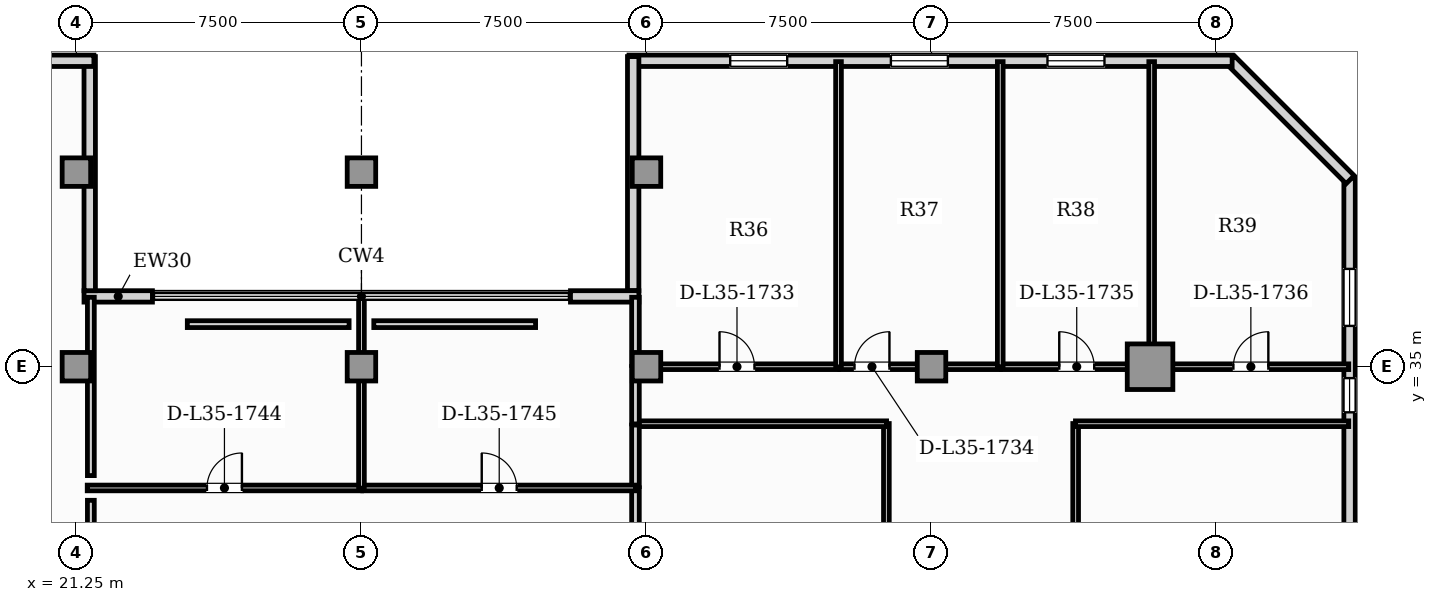
"""IFC4 building model, lengths in metres.
Left out: names, types, materials, properties, quantities, classifications, styles, units other than length and angle.
Written with IfcOpenShell. Run it as: python <this file> out.ifc"""

import sys

from ifc_helpers import new_model, si_unit, direction, frame, frame_2d, origin, origin_2d, place, context, subcontext, project, spatial, rectangle, hollow_rectangle, extrude, element, fill, save


model = new_model("IFC4")
c1 = context("Model", 3, precision=1e-05, world=origin(), true_north=direction((0.0, 1.0)))
c2 = subcontext(c1, "Body", "Model", "MODEL_VIEW")
j1 = project(units=[si_unit("LENGTHUNIT", "METRE"), si_unit("PLANEANGLEUNIT", "RADIAN")], contexts=[c1])
p1 = place(None, origin())
s1 = spatial("IfcSite", under=j1, at=p1, CompositionType="ELEMENT")
p2 = place(p1, origin())
s2 = spatial("IfcBuilding", under=s1, at=p2, CompositionType="ELEMENT")
p3 = place(p2, frame((0.0, 0.0, 145.2)))
s3 = spatial("IfcBuildingStorey", under=s2, at=p3, CompositionType="ELEMENT", Elevation=145.2)
p4 = place(p3, frame((49.5, 35.0, 0.0), z_axis=(0.0, 0.0, 1.0), x_axis=(1.0, 0.0, 0.0)))
e1 = element("IfcColumn", 1, at=p4, inside=s3, PredefinedType="USERDEFINED", context=c2, shape_type="SweptSolid", body=[
    extrude(hollow_rectangle(XDim=1.2, YDim=1.2, WallThickness=0.07, at=origin_2d()), origin(), (0.0, 0.0, 1.0), 3.85),
])
for number, where, z_axis, x_axis in (
    (2, (21.25, 40.12, 0.0), (0.0, 0.0, 1.0), (1.0, 0.0, 0.0)),
    (3, (28.75, 40.12, 0.0), (0.0, 0.0, 1.0), (1.0, 0.0, 0.0)),
    (4, (36.25, 40.12, 0.0), (0.0, 0.0, 1.0), (1.0, 0.0, 0.0)),
    (5, (21.25, 35.0, 0.0), (0.0, 0.0, 1.0), (1.0, 0.0, 0.0)),
    (6, (28.75, 35.0, 0.0), (0.0, 0.0, 1.0), (1.0, 0.0, 0.0)),
    (7, (36.25, 35.0, 0.0), (0.0, 0.0, 1.0), (1.0, 0.0, 0.0)),
    (8, (43.75, 35.0, 0.0), (0.0, 0.0, 1.0), (1.0, 0.0, 0.0)),
):
    element("IfcColumn", number, at=place(p3, frame(where, z_axis=z_axis, x_axis=x_axis)), inside=s3, PredefinedType="COLUMN", context=c2, shape_type="SweptSolid", body=[
        extrude(rectangle(XDim=0.75, YDim=0.75, at=origin_2d()), origin(), (0.0, 0.0, 1.0), 3.85),
    ])
p5 = place(p3, frame((54.75, 3.24, 0.0), z_axis=(0.0, 0.0, 1.0), x_axis=(0.0, 1.0, 0.0)))
e9 = element("IfcWall", 9, at=p5, inside=s3, PredefinedType="SOLIDWALL", context=c2, shape_type="SweptSolid", body=[
    extrude(rectangle(XDim=36.72, YDim=0.3, at=frame_2d((18.36, 0.0))), origin(), (0.0, 0.0, 1.0), 3.63),
])
p6 = place(p5, frame((30.56, 0.0, 0.95)))
e10 = element("IfcOpeningElement", 10, at=p6, cuts=e9, PredefinedType="OPENING", context=c2, shape_type="SweptSolid", body=[
    extrude(rectangle(XDim=0.9, YDim=1.5, at=frame_2d((0.45, 0.75))), frame((0.0, 0.16, 0.0), z_axis=(0.0, -1.0, 0.0), x_axis=(1.0, 0.0, 0.0)), (0.0, 0.0, 1.0), 0.32),
])
p7 = place(p5, frame((10.995, 0.0, 0.95)))
e11 = element("IfcOpeningElement", 11, at=p7, cuts=e9, PredefinedType="OPENING", context=c2, shape_type="SweptSolid", body=[
    extrude(rectangle(XDim=0.9, YDim=1.5, at=frame_2d((0.45, 0.75))), frame((0.0, 0.16, 0.0), z_axis=(0.0, -1.0, 0.0), x_axis=(1.0, 0.0, 0.0)), (0.0, 0.0, 1.0), 0.32),
])
p8 = place(p5, frame((13.568, 0.0, 0.9)))
e12 = element("IfcOpeningElement", 12, at=p8, cuts=e9, PredefinedType="OPENING", context=c2, shape_type="SweptSolid", body=[
    extrude(rectangle(XDim=1.5, YDim=1.95, at=frame_2d((0.75, 0.975))), frame((0.0, 0.16, 0.0), z_axis=(0.0, -1.0, 0.0), x_axis=(1.0, 0.0, 0.0)), (0.0, 0.0, 1.0), 0.32),
])
p9 = place(p5, frame((18.404, 0.0, 0.9)))
e13 = element("IfcOpeningElement", 13, at=p9, cuts=e9, PredefinedType="OPENING", context=c2, shape_type="SweptSolid", body=[
    extrude(rectangle(XDim=1.5, YDim=1.95, at=frame_2d((0.75, 0.975))), frame((0.0, 0.16, 0.0), z_axis=(0.0, -1.0, 0.0), x_axis=(1.0, 0.0, 0.0)), (0.0, 0.0, 1.0), 0.32),
])
p10 = place(p5, frame((25.396, 0.0, 0.9)))
e14 = element("IfcOpeningElement", 14, at=p10, cuts=e9, PredefinedType="OPENING", context=c2, shape_type="SweptSolid", body=[
    extrude(rectangle(XDim=1.5, YDim=1.95, at=frame_2d((0.75, 0.975))), frame((0.0, 0.16, 0.0), z_axis=(0.0, -1.0, 0.0), x_axis=(1.0, 0.0, 0.0)), (0.0, 0.0, 1.0), 0.32),
])
p11 = place(p5, frame((32.834, 0.0, 0.9)))
e15 = element("IfcOpeningElement", 15, at=p11, cuts=e9, PredefinedType="OPENING", context=c2, shape_type="SweptSolid", body=[
    extrude(rectangle(XDim=1.5, YDim=1.95, at=frame_2d((0.75, 0.975))), frame((0.0, 0.16, 0.0), z_axis=(0.0, -1.0, 0.0), x_axis=(1.0, 0.0, 0.0)), (0.0, 0.0, 1.0), 0.32),
])
p12 = place(p3, frame((54.766, 39.922, 0.0), z_axis=(0.0, 0.0, 1.0), x_axis=(-0.707079321262, 0.707134240044, 0.0)))
e16 = element("IfcWall", 16, at=p12, inside=s3, PredefinedType="SOLIDWALL", context=c2, shape_type="SweptSolid", body=[
    extrude(rectangle(XDim=4.446, YDim=0.3, at=frame_2d((2.223, 0.0))), origin(), (0.0, 0.0, 1.0), 3.63),
])
p13 = place(p3, frame((51.66, 43.05, 0.0), z_axis=(0.0, 0.0, 1.0), x_axis=(-1.0, 0.0, 0.0)))
e17 = element("IfcWall", 17, at=p13, inside=s3, PredefinedType="SOLIDWALL", context=c2, shape_type="SweptSolid", body=[
    extrude(rectangle(XDim=15.87, YDim=0.3, at=frame_2d((7.935, 0.0))), origin(), (0.0, 0.0, 1.0), 3.63),
])
p14 = place(p13, frame((11.708, 0.0, 0.9)))
e18 = element("IfcOpeningElement", 18, at=p14, cuts=e17, PredefinedType="OPENING", context=c2, shape_type="SweptSolid", body=[
    extrude(rectangle(XDim=1.5, YDim=1.95, at=frame_2d((0.75, 0.975))), frame((0.0, 0.16, 0.0), z_axis=(0.0, -1.0, 0.0), x_axis=(1.0, 0.0, 0.0)), (0.0, 0.0, 1.0), 0.32),
])
p15 = place(p13, frame((7.479, 0.0, 0.9)))
e19 = element("IfcOpeningElement", 19, at=p15, cuts=e17, PredefinedType="OPENING", context=c2, shape_type="SweptSolid", body=[
    extrude(rectangle(XDim=1.5, YDim=1.95, at=frame_2d((0.75, 0.975))), frame((0.0, 0.16, 0.0), z_axis=(0.0, -1.0, 0.0), x_axis=(1.0, 0.0, 0.0)), (0.0, 0.0, 1.0), 0.32),
])
p16 = place(p13, frame((3.359, 0.0, 0.9)))
e20 = element("IfcOpeningElement", 20, at=p16, cuts=e17, PredefinedType="OPENING", context=c2, shape_type="SweptSolid", body=[
    extrude(rectangle(XDim=1.5, YDim=1.95, at=frame_2d((0.75, 0.975))), frame((0.0, 0.16, 0.0), z_axis=(0.0, -1.0, 0.0), x_axis=(1.0, 0.0, 0.0)), (0.0, 0.0, 1.0), 0.32),
])
p17 = place(p3, frame((35.9, 43.16, 0.0), z_axis=(0.0, 0.0, 1.0), x_axis=(0.0, -1.0, 0.0)))
e21 = element("IfcWall", 21, at=p17, inside=s3, PredefinedType="SOLIDWALL", context=c2, shape_type="SweptSolid", body=[
    extrude(rectangle(XDim=6.16, YDim=0.3, at=frame_2d((3.08, 0.0))), origin(), (0.0, 0.0, 1.0), 3.63),
])
for number, where, z_axis, x_axis in (
    (22, (21.45, 36.85, 0.0), (0.0, 0.0, 1.0), (1.0, 0.0, 0.0)),
    (23, (34.25, 36.85, 0.0), (0.0, 0.0, 1.0), (1.0, 0.0, 0.0)),
):
    element("IfcWall", number, at=place(p3, frame(where, z_axis=z_axis, x_axis=x_axis)), inside=s3, PredefinedType="SOLIDWALL", context=c2, shape_type="SweptSolid", body=[
        extrude(rectangle(XDim=1.8, YDim=0.3, at=frame_2d((0.9, 0.0))), origin(), (0.0, 0.0, 1.0), 3.63),
    ])
p18 = place(p3, frame((21.6, 37.0, 0.0), z_axis=(0.0, 0.0, 1.0), x_axis=(0.0, 1.0, 0.0)))
e24 = element("IfcWall", 24, at=p18, inside=s3, PredefinedType="SOLIDWALL", context=c2, shape_type="SweptSolid", body=[
    extrude(rectangle(XDim=6.16, YDim=0.3, at=frame_2d((3.08, 0.0))), origin(), (0.0, 0.0, 1.0), 3.63),
])
p19 = place(p3, frame((21.71, 43.05, 0.0), z_axis=(0.0, 0.0, 1.0), x_axis=(-1.0, 0.0, 0.0)))
e25 = element("IfcWall", 25, at=p19, inside=s3, PredefinedType="SOLIDWALL", context=c2, shape_type="SweptSolid", body=[
    extrude(rectangle(XDim=15.87, YDim=0.3, at=frame_2d((7.935, 0.0))), origin(), (0.0, 0.0, 1.0), 3.63),
])
p20 = place(p19, frame((14.19, 0.0, 0.95)))
e26 = element("IfcOpeningElement", 26, at=p20, cuts=e25, PredefinedType="OPENING", context=c2, shape_type="SweptSolid", body=[
    extrude(rectangle(XDim=0.9, YDim=1.5, at=frame_2d((0.45, 0.75))), frame((0.0, 0.16, 0.0), z_axis=(0.0, -1.0, 0.0), x_axis=(1.0, 0.0, 0.0)), (0.0, 0.0, 1.0), 0.32),
])
p21 = place(p19, frame((11.055, 0.0, 0.9)))
e27 = element("IfcOpeningElement", 27, at=p21, cuts=e25, PredefinedType="OPENING", context=c2, shape_type="SweptSolid", body=[
    extrude(rectangle(XDim=1.5, YDim=1.95, at=frame_2d((0.75, 0.975))), frame((0.0, 0.16, 0.0), z_axis=(0.0, -1.0, 0.0), x_axis=(1.0, 0.0, 0.0)), (0.0, 0.0, 1.0), 0.32),
])
p22 = place(p19, frame((7.479, 0.0, 0.9)))
e28 = element("IfcOpeningElement", 28, at=p22, cuts=e25, PredefinedType="OPENING", context=c2, shape_type="SweptSolid", body=[
    extrude(rectangle(XDim=1.5, YDim=1.95, at=frame_2d((0.75, 0.975))), frame((0.0, 0.16, 0.0), z_axis=(0.0, -1.0, 0.0), x_axis=(1.0, 0.0, 0.0)), (0.0, 0.0, 1.0), 0.32),
])
p23 = place(p3, frame((42.562, 24.479, 0.0), z_axis=(0.0, 0.0, 1.0), x_axis=(0.0, 1.0, 0.0)))
e29 = element("IfcWall", 29, at=p23, inside=s3, PredefinedType="PARTITIONING", context=c2, shape_type="SweptSolid", body=[
    extrude(rectangle(XDim=9.026, YDim=0.15, at=frame_2d((4.513, 0.0))), origin(), (0.0, 0.0, 1.0), 3.63),
])
p24 = place(p23, frame((5.407, 0.0, 0.0)))
e30 = element("IfcOpeningElement", 30, at=p24, cuts=e29, PredefinedType="OPENING", context=c2, shape_type="SweptSolid", body=[
    extrude(rectangle(XDim=0.92, YDim=2.1, at=frame_2d((0.46, 1.05))), frame((0.0, 0.085, 0.0), z_axis=(0.0, -1.0, 0.0), x_axis=(1.0, 0.0, 0.0)), (0.0, 0.0, 1.0), 0.17),
])
p25 = place(p3, frame((35.955, 33.5, 0.0), z_axis=(0.0, 0.0, 1.0), x_axis=(1.0, 0.0, 0.0)))
e31 = element("IfcWall", 31, at=p25, inside=s3, PredefinedType="PARTITIONING", context=c2, shape_type="SweptSolid", body=[
    extrude(rectangle(XDim=6.612, YDim=0.15, at=frame_2d((3.306, 0.0))), origin(), (0.0, 0.0, 1.0), 3.63),
])
p26 = place(p3, frame((47.542, 25.307, 0.0), z_axis=(0.0, 0.0, 1.0), x_axis=(0.0, 1.0, 0.0)))
e32 = element("IfcWall", 32, at=p26, inside=s3, PredefinedType="PARTITIONING", context=c2, shape_type="SweptSolid", body=[
    extrude(rectangle(XDim=8.198, YDim=0.15, at=frame_2d((4.099, 0.0))), origin(), (0.0, 0.0, 1.0), 3.177),
])
p27 = place(p26, frame((3.639, 0.0, 0.0)))
e33 = element("IfcOpeningElement", 33, at=p27, cuts=e32, PredefinedType="OPENING", context=c2, shape_type="SweptSolid", body=[
    extrude(rectangle(XDim=0.92, YDim=2.1, at=frame_2d((0.46, 1.05))), frame((0.0, 0.085, 0.0), z_axis=(0.0, -1.0, 0.0), x_axis=(1.0, 0.0, 0.0)), (0.0, 0.0, 1.0), 0.17),
])
p28 = place(p3, frame((47.537, 33.5, 0.0), z_axis=(0.0, 0.0, 1.0), x_axis=(1.0, 0.0, 0.0)))
e34 = element("IfcWall", 34, at=p28, inside=s3, PredefinedType="PARTITIONING", context=c2, shape_type="SweptSolid", body=[
    extrude(rectangle(XDim=7.19, YDim=0.15, at=frame_2d((3.595, 0.0))), origin(), (0.0, 0.0, 1.0), 3.63),
])
p29 = place(p3, frame((35.955, 35.0, 0.0), z_axis=(0.0, 0.0, 1.0), x_axis=(1.0, 0.0, 0.0)))
e35 = element("IfcWall", 35, at=p29, inside=s3, PredefinedType="PARTITIONING", context=c2, shape_type="SweptSolid", body=[
    extrude(rectangle(XDim=5.353, YDim=0.15, at=frame_2d((2.676, 0.0))), origin(), (0.0, 0.0, 1.0), 3.013),
])
p30 = place(p29, frame((2.216, 0.0, 0.0)))
e36 = element("IfcOpeningElement", 36, at=p30, cuts=e35, PredefinedType="OPENING", context=c2, shape_type="SweptSolid", body=[
    extrude(rectangle(XDim=0.92, YDim=2.1, at=frame_2d((0.46, 1.05))), frame((0.0, 0.085, 0.0), z_axis=(0.0, -1.0, 0.0), x_axis=(1.0, 0.0, 0.0)), (0.0, 0.0, 1.0), 0.17),
])
p31 = place(p3, frame((41.338, 35.0, 0.0), z_axis=(0.0, 0.0, 1.0), x_axis=(1.0, 0.0, 0.0)))
e37 = element("IfcWall", 37, at=p31, inside=s3, PredefinedType="PARTITIONING", context=c2, shape_type="SweptSolid", body=[
    extrude(rectangle(XDim=4.226, YDim=0.15, at=frame_2d((2.113, 0.0))), origin(), (0.0, 0.0, 1.0), 3.013),
])
p32 = place(p31, frame((0.385, 0.0, 0.0)))
e38 = element("IfcOpeningElement", 38, at=p32, cuts=e37, PredefinedType="OPENING", context=c2, shape_type="SweptSolid", body=[
    extrude(rectangle(XDim=0.92, YDim=2.1, at=frame_2d((0.46, 1.05))), frame((0.0, 0.085, 0.0), z_axis=(0.0, -1.0, 0.0), x_axis=(1.0, 0.0, 0.0)), (0.0, 0.0, 1.0), 0.17),
])
p33 = place(p3, frame((45.594, 35.0, 0.0), z_axis=(0.0, 0.0, 1.0), x_axis=(1.0, 0.0, 0.0)))
e39 = element("IfcWall", 39, at=p33, inside=s3, PredefinedType="PARTITIONING", context=c2, shape_type="SweptSolid", body=[
    extrude(rectangle(XDim=3.954, YDim=0.15, at=frame_2d((1.977, 0.0))), origin(), (0.0, 0.0, 1.0), 3.013),
])
p34 = place(p33, frame((1.517, 0.0, 0.0)))
e40 = element("IfcOpeningElement", 40, at=p34, cuts=e39, PredefinedType="OPENING", context=c2, shape_type="SweptSolid", body=[
    extrude(rectangle(XDim=0.92, YDim=2.1, at=frame_2d((0.46, 1.05))), frame((0.0, 0.085, 0.0), z_axis=(0.0, -1.0, 0.0), x_axis=(1.0, 0.0, 0.0)), (0.0, 0.0, 1.0), 0.17),
])
p35 = place(p3, frame((49.578, 35.0, 0.0), z_axis=(0.0, 0.0, 1.0), x_axis=(1.0, 0.0, 0.0)))
e41 = element("IfcWall", 41, at=p35, inside=s3, PredefinedType="PARTITIONING", context=c2, shape_type="SweptSolid", body=[
    extrude(rectangle(XDim=5.15, YDim=0.15, at=frame_2d((2.575, 0.0))), origin(), (0.0, 0.0, 1.0), 3.63),
])
p36 = place(p35, frame((2.115, 0.0, 0.0)))
e42 = element("IfcOpeningElement", 42, at=p36, cuts=e41, PredefinedType="OPENING", context=c2, shape_type="SweptSolid", body=[
    extrude(rectangle(XDim=0.92, YDim=2.1, at=frame_2d((0.46, 1.05))), frame((0.0, 0.085, 0.0), z_axis=(0.0, -1.0, 0.0), x_axis=(1.0, 0.0, 0.0)), (0.0, 0.0, 1.0), 0.17),
])
p37 = place(p3, frame((35.96, 33.495, 0.0), z_axis=(0.0, 0.0, 1.0), x_axis=(0.0, 1.0, 0.0)))
e43 = element("IfcWall", 43, at=p37, inside=s3, PredefinedType="PARTITIONING", context=c2, shape_type="SweptSolid", body=[
    extrude(rectangle(XDim=1.51, YDim=0.2, at=frame_2d((0.755, 0.0))), origin(), (0.0, 0.0, 1.0), 3.63),
])
p38 = place(p3, frame((35.96, 30.305, 0.0), z_axis=(0.0, 0.0, 1.0), x_axis=(0.0, 1.0, 0.0)))
e44 = element("IfcWall", 44, at=p38, inside=s3, PredefinedType="PARTITIONING", context=c2, shape_type="SweptSolid", body=[
    extrude(rectangle(XDim=1.51, YDim=0.2, at=frame_2d((0.755, 0.0))), origin(), (0.0, 0.0, 1.0), 3.63),
])
p39 = place(p3, frame((35.96, 31.845, 0.0), z_axis=(0.0, 0.0, 1.0), x_axis=(0.0, 1.0, 0.0)))
e45 = element("IfcWall", 45, at=p39, inside=s3, PredefinedType="PARTITIONING", context=c2, shape_type="SweptSolid", body=[
    extrude(rectangle(XDim=1.62, YDim=0.2, at=frame_2d((0.81, 0.0))), origin(), (0.0, 0.0, 1.0), 3.63),
])
p40 = place(p3, frame((41.303, 34.995, 0.0), z_axis=(0.0, 0.0, 1.0), x_axis=(0.0, 1.0, 0.0)))
e46 = element("IfcWall", 46, at=p40, inside=s3, PredefinedType="PARTITIONING", context=c2, shape_type="SweptSolid", body=[
    extrude(rectangle(XDim=8.032, YDim=0.15, at=frame_2d((4.016, 0.0))), origin(), (0.0, 0.0, 1.0), 3.63),
])
p41 = place(p3, frame((35.96, 35.035, 0.0), z_axis=(0.0, 0.0, 1.0), x_axis=(0.0, 1.0, 0.0)))
e47 = element("IfcWall", 47, at=p41, inside=s3, PredefinedType="PARTITIONING", context=c2, shape_type="SweptSolid", body=[
    extrude(rectangle(XDim=1.792, YDim=0.2, at=frame_2d((0.896, 0.0))), origin(), (0.0, 0.0, 1.0), 3.63),
])
for number, where, z_axis, x_axis in (
    (48, (45.559, 34.995, 0.0), (0.0, 0.0, 1.0), (0.0, 1.0, 0.0)),
    (49, (49.542, 34.995, 0.0), (0.0, 0.0, 1.0), (0.0, 1.0, 0.0)),
):
    element("IfcWall", number, at=place(p3, frame(where, z_axis=z_axis, x_axis=x_axis)), inside=s3, PredefinedType="PARTITIONING", context=c2, shape_type="SweptSolid", body=[
        extrude(rectangle(XDim=8.032, YDim=0.15, at=frame_2d((4.016, 0.0))), origin(), (0.0, 0.0, 1.0), 3.63),
    ])
p42 = place(p3, frame((21.535, 31.81, 0.0), z_axis=(0.0, 0.0, 1.0), x_axis=(1.0, 0.0, 0.0)))
e50 = element("IfcWall", 50, at=p42, inside=s3, PredefinedType="PARTITIONING", context=c2, shape_type="SweptSolid", body=[
    extrude(rectangle(XDim=7.22, YDim=0.15, at=frame_2d((3.61, 0.0))), origin(), (0.0, 0.0, 1.0), 3.63),
])
p43 = place(p42, frame((3.15, 0.0, 0.0)))
e51 = element("IfcOpeningElement", 51, at=p43, cuts=e50, PredefinedType="OPENING", context=c2, shape_type="SweptSolid", body=[
    extrude(rectangle(XDim=0.92, YDim=2.1, at=frame_2d((0.46, 1.05))), frame((0.0, 0.085, 0.0), z_axis=(0.0, -1.0, 0.0), x_axis=(1.0, 0.0, 0.0)), (0.0, 0.0, 1.0), 0.17),
])
p44 = place(p3, frame((28.785, 31.81, 0.0), z_axis=(0.0, 0.0, 1.0), x_axis=(1.0, 0.0, 0.0)))
e52 = element("IfcWall", 52, at=p44, inside=s3, PredefinedType="PARTITIONING", context=c2, shape_type="SweptSolid", body=[
    extrude(rectangle(XDim=7.18, YDim=0.15, at=frame_2d((3.59, 0.0))), origin(), (0.0, 0.0, 1.0), 3.63),
])
p45 = place(p44, frame((3.13, 0.0, 0.0)))
e53 = element("IfcOpeningElement", 53, at=p45, cuts=e52, PredefinedType="OPENING", context=c2, shape_type="SweptSolid", body=[
    extrude(rectangle(XDim=0.92, YDim=2.1, at=frame_2d((0.46, 1.05))), frame((0.0, 0.085, 0.0), z_axis=(0.0, -1.0, 0.0), x_axis=(1.0, 0.0, 0.0)), (0.0, 0.0, 1.0), 0.17),
])
p46 = place(p3, frame((28.75, 31.805, 0.0), z_axis=(0.0, 0.0, 1.0), x_axis=(0.0, 1.0, 0.0)))
e54 = element("IfcWall", 54, at=p46, inside=s3, PredefinedType="PARTITIONING", context=c2, shape_type="SweptSolid", body=[
    extrude(rectangle(XDim=5.021, YDim=0.15, at=frame_2d((2.51, 0.0))), origin(), (0.0, 0.0, 1.0), 3.177),
])
p47 = place(p3, frame((21.63, 30.635, 0.0), z_axis=(0.0, 0.0, 1.0), x_axis=(0.0, 1.0, 0.0)))
e55 = element("IfcWall", 55, at=p47, inside=s3, PredefinedType="PARTITIONING", context=c2, shape_type="SweptSolid", body=[
    extrude(rectangle(XDim=0.85, YDim=0.18, at=frame_2d((0.425, 0.0))), origin(), (0.0, 0.0, 1.0), 3.63),
])
p48 = place(p3, frame((21.63, 32.135, 0.0), z_axis=(0.0, 0.0, 1.0), x_axis=(0.0, 1.0, 0.0)))
e56 = element("IfcWall", 56, at=p48, inside=s3, PredefinedType="PARTITIONING", context=c2, shape_type="SweptSolid", body=[
    extrude(rectangle(XDim=4.692, YDim=0.18, at=frame_2d((2.346, 0.0))), origin(), (0.0, 0.0, 1.0), 3.63),
])
for number, where, z_axis, x_axis in (
    (57, (24.168, 36.12, 0.0), (0.0, 0.0, 1.0), (1.0, 0.0, 0.0)),
    (58, (29.075, 36.12, 0.0), (0.0, 0.0, 1.0), (1.0, 0.0, 0.0)),
):
    element("IfcWall", number, at=place(p3, frame(where, z_axis=z_axis, x_axis=x_axis)), inside=s3, PredefinedType="PARTITIONING", context=c2, shape_type="SweptSolid", body=[
        extrude(rectangle(XDim=4.257, YDim=0.18, at=frame_2d((2.128, 0.0))), origin(), (0.0, 0.0, 1.0), 3.63),
    ])
p49 = place(p6, origin())
e59 = element("IfcWindow", 59, at=p49, inside=s3, PartitioningType="SINGLE_PANEL", PredefinedType="WINDOW", context=c2, shape_type="SweptSolid", body=[
    extrude(rectangle(XDim=0.9, YDim=1.5, at=frame_2d((0.45, 0.75))), frame((0.0, 0.03, 0.0), z_axis=(0.0, -1.0, 0.0), x_axis=(1.0, 0.0, 0.0)), (0.0, 0.0, 1.0), 0.06),
])
fill(e10, e59)
p50 = place(p14, origin())
e60 = element("IfcWindow", 60, at=p50, inside=s3, PartitioningType="SINGLE_PANEL", PredefinedType="WINDOW", context=c2, shape_type="SweptSolid", body=[
    extrude(rectangle(XDim=1.5, YDim=1.95, at=frame_2d((0.75, 0.975))), frame((0.0, 0.03, 0.0), z_axis=(0.0, -1.0, 0.0), x_axis=(1.0, 0.0, 0.0)), (0.0, 0.0, 1.0), 0.06),
])
fill(e18, e60)
p51 = place(p15, origin())
e61 = element("IfcWindow", 61, at=p51, inside=s3, PartitioningType="SINGLE_PANEL", PredefinedType="WINDOW", context=c2, shape_type="SweptSolid", body=[
    extrude(rectangle(XDim=1.5, YDim=1.95, at=frame_2d((0.75, 0.975))), frame((0.0, 0.03, 0.0), z_axis=(0.0, -1.0, 0.0), x_axis=(1.0, 0.0, 0.0)), (0.0, 0.0, 1.0), 0.06),
])
fill(e19, e61)
p52 = place(p16, origin())
e62 = element("IfcWindow", 62, at=p52, inside=s3, PartitioningType="SINGLE_PANEL", PredefinedType="WINDOW", context=c2, shape_type="SweptSolid", body=[
    extrude(rectangle(XDim=1.5, YDim=1.95, at=frame_2d((0.75, 0.975))), frame((0.0, 0.03, 0.0), z_axis=(0.0, -1.0, 0.0), x_axis=(1.0, 0.0, 0.0)), (0.0, 0.0, 1.0), 0.06),
])
fill(e20, e62)
p53 = place(p11, origin())
e63 = element("IfcWindow", 63, at=p53, inside=s3, PartitioningType="SINGLE_PANEL", PredefinedType="WINDOW", context=c2, shape_type="SweptSolid", body=[
    extrude(rectangle(XDim=1.5, YDim=1.95, at=frame_2d((0.75, 0.975))), frame((0.0, 0.03, 0.0), z_axis=(0.0, -1.0, 0.0), x_axis=(1.0, 0.0, 0.0)), (0.0, 0.0, 1.0), 0.06),
])
fill(e15, e63)
p54 = place(p30, origin())
e64 = element("IfcDoor", 64, at=p54, inside=s3, OperationType="SINGLE_SWING_LEFT", PredefinedType="DOOR", context=c2, shape_type="SweptSolid", body=[
    extrude(rectangle(XDim=0.92, YDim=2.1, at=frame_2d((0.46, 1.05))), frame((0.0, 0.025, 0.0), z_axis=(0.0, -1.0, 0.0), x_axis=(1.0, 0.0, 0.0)), (0.0, 0.0, 1.0), 0.05),
])
fill(e36, e64)
p55 = place(p32, origin())
e65 = element("IfcDoor", 65, at=p55, inside=s3, OperationType="SINGLE_SWING_RIGHT", PredefinedType="DOOR", context=c2, shape_type="SweptSolid", body=[
    extrude(rectangle(XDim=0.92, YDim=2.1, at=frame_2d((0.46, 1.05))), frame((0.0, 0.025, 0.0), z_axis=(0.0, -1.0, 0.0), x_axis=(1.0, 0.0, 0.0)), (0.0, 0.0, 1.0), 0.05),
])
fill(e38, e65)
p56 = place(p34, origin())
e66 = element("IfcDoor", 66, at=p56, inside=s3, OperationType="SINGLE_SWING_LEFT", PredefinedType="DOOR", context=c2, shape_type="SweptSolid", body=[
    extrude(rectangle(XDim=0.92, YDim=2.1, at=frame_2d((0.46, 1.05))), frame((0.0, 0.025, 0.0), z_axis=(0.0, -1.0, 0.0), x_axis=(1.0, 0.0, 0.0)), (0.0, 0.0, 1.0), 0.05),
])
fill(e40, e66)
p57 = place(p36, origin())
e67 = element("IfcDoor", 67, at=p57, inside=s3, OperationType="SINGLE_SWING_RIGHT", PredefinedType="DOOR", context=c2, shape_type="SweptSolid", body=[
    extrude(rectangle(XDim=0.92, YDim=2.1, at=frame_2d((0.46, 1.05))), frame((0.0, 0.025, 0.0), z_axis=(0.0, -1.0, 0.0), x_axis=(1.0, 0.0, 0.0)), (0.0, 0.0, 1.0), 0.05),
])
fill(e42, e67)
p58 = place(p43, origin())
e68 = element("IfcDoor", 68, at=p58, inside=s3, OperationType="SINGLE_SWING_RIGHT", PredefinedType="DOOR", context=c2, shape_type="SweptSolid", body=[
    extrude(rectangle(XDim=0.92, YDim=2.1, at=frame_2d((0.46, 1.05))), frame((0.0, 0.025, 0.0), z_axis=(0.0, -1.0, 0.0), x_axis=(1.0, 0.0, 0.0)), (0.0, 0.0, 1.0), 0.05),
])
fill(e51, e68)
p59 = place(p45, origin())
e69 = element("IfcDoor", 69, at=p59, inside=s3, OperationType="SINGLE_SWING_LEFT", PredefinedType="DOOR", context=c2, shape_type="SweptSolid", body=[
    extrude(rectangle(XDim=0.92, YDim=2.1, at=frame_2d((0.46, 1.05))), frame((0.0, 0.025, 0.0), z_axis=(0.0, -1.0, 0.0), x_axis=(1.0, 0.0, 0.0)), (0.0, 0.0, 1.0), 0.05),
])
fill(e53, e69)
save(model, sys.argv[1])
